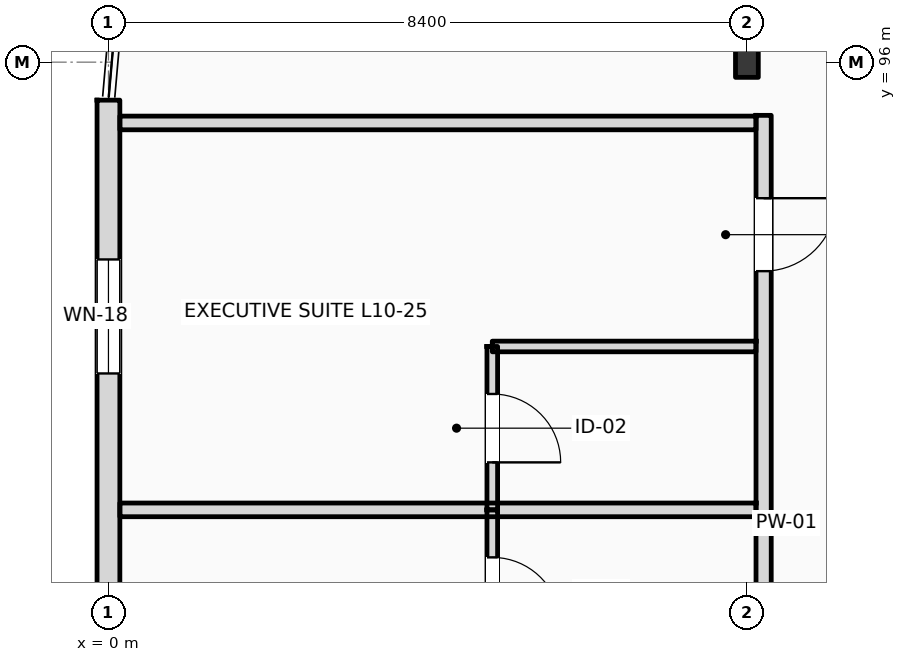
"""IFC4 building model, lengths in metres.
Left out: names, types, materials, properties, quantities, classifications, styles, units other than length and angle.
Written with IfcOpenShell. Run it as: python <this file> out.ifc"""

import sys

from ifc_helpers import new_model, si_unit, direction, frame, frame_2d, origin, origin_2d, place, context, subcontext, project, spatial, rectangle, i_section, extrude, element, fill, save


model = new_model("IFC4")
c1 = context("Model", 3, precision=1e-05, world=origin(), true_north=direction((0.0, 1.0)))
c2 = subcontext(c1, "Body", "Model", "MODEL_VIEW")
j1 = project(units=[si_unit("LENGTHUNIT", "METRE"), si_unit("PLANEANGLEUNIT", "RADIAN")], contexts=[c1])
p1 = place(None, origin())
s1 = spatial("IfcSite", under=j1, at=p1, CompositionType="ELEMENT")
p2 = place(p1, origin())
s2 = spatial("IfcBuilding", under=s1, at=p2, CompositionType="ELEMENT")
p3 = place(p2, frame((0.0, 0.0, 42.6)))
s3 = spatial("IfcBuildingStorey", under=s2, at=p3, CompositionType="ELEMENT", Elevation=42.6)
p4 = place(p3, frame((8.4, 96.0, 0.0), z_axis=(0.0, 0.0, 1.0), x_axis=(1.0, 0.0, 0.0)))
e1 = element("IfcColumn", 1, at=p4, inside=s3, PredefinedType="COLUMN", context=c2, shape_type="SweptSolid", body=[
    extrude(i_section(OverallWidth=0.3, OverallDepth=0.4, WebThickness=0.013, FlangeThickness=0.024, FilletRadius=0.027, at=origin_2d()), origin(), (0.0, 0.0, 1.0), 4.2),
])
p5 = place(p3, frame((0.0, 88.0, 0.0), z_axis=(0.0, 0.0, 1.0), x_axis=(0.0, 1.0, 0.0)))
e2 = element("IfcWall", 2, at=p5, inside=s3, PredefinedType="STANDARD", context=c2, shape_type="SweptSolid", body=[
    extrude(rectangle(XDim=7.5, YDim=0.3, at=frame_2d((3.75, 0.0))), origin(), (0.0, 0.0, 1.0), 3.94),
])
p6 = place(p5, frame((3.904, 0.0, 0.9)))
e3 = element("IfcOpeningElement", 3, at=p6, cuts=e2, PredefinedType="OPENING", context=c2, shape_type="SweptSolid", body=[
    extrude(rectangle(XDim=1.5, YDim=2.86, at=frame_2d((0.75, 1.43))), frame((0.0, 0.16, 0.0), z_axis=(0.0, -1.0, 0.0), x_axis=(1.0, 0.0, 0.0)), (0.0, 0.0, 1.0), 0.32),
])
p7 = place(p3, frame((8.62, 79.64, 0.0), z_axis=(0.0, 0.0, 1.0), x_axis=(0.0, 1.0, 0.0)))
e4 = element("IfcWall", 4, at=p7, inside=s3, PredefinedType="PARTITIONING", context=c2, shape_type="SweptSolid", body=[
    extrude(rectangle(XDim=15.66, YDim=0.2, at=frame_2d((7.83, 0.0))), origin(), (0.0, 0.0, 1.0), 3.57),
])
p8 = place(p7, frame((3.28, 0.0, 0.0)))
e5 = element("IfcOpeningElement", 5, at=p8, cuts=e4, PredefinedType="OPENING", context=c2, shape_type="SweptSolid", body=[
    extrude(rectangle(XDim=0.96, YDim=2.2, at=frame_2d((0.48, 1.1))), frame((0.0, 0.11, 0.0), z_axis=(0.0, -1.0, 0.0), x_axis=(1.0, 0.0, 0.0)), (0.0, 0.0, 1.0), 0.22),
])
p9 = place(p7, frame((6.034, 0.0, 0.0)))
e6 = element("IfcOpeningElement", 6, at=p9, cuts=e4, PredefinedType="OPENING", context=c2, shape_type="SweptSolid", body=[
    extrude(rectangle(XDim=0.96, YDim=2.2, at=frame_2d((0.48, 1.1))), frame((0.0, 0.11, 0.0), z_axis=(0.0, -1.0, 0.0), x_axis=(1.0, 0.0, 0.0)), (0.0, 0.0, 1.0), 0.22),
])
p10 = place(p7, frame((13.61, 0.0, 0.0)))
e7 = element("IfcOpeningElement", 7, at=p10, cuts=e4, PredefinedType="OPENING", context=c2, shape_type="SweptSolid", body=[
    extrude(rectangle(XDim=0.96, YDim=2.2, at=frame_2d((0.48, 1.1))), frame((0.0, 0.11, 0.0), z_axis=(0.0, -1.0, 0.0), x_axis=(1.0, 0.0, 0.0)), (0.0, 0.0, 1.0), 0.22),
])
p11 = place(p3, frame((0.15, 90.109, 0.0), z_axis=(0.0, 0.0, 1.0), x_axis=(1.0, 0.0, 0.0)))
e8 = element("IfcWall", 8, at=p11, inside=s3, PredefinedType="PARTITIONING", context=c2, shape_type="SweptSolid", body=[
    extrude(rectangle(XDim=8.37, YDim=0.18, at=frame_2d((4.185, 0.0))), origin(), (0.0, 0.0, 1.0), 3.94),
])
p12 = place(p3, frame((5.05, 87.959, 0.0), z_axis=(0.0, 0.0, 1.0), x_axis=(0.0, 1.0, 0.0)))
e9 = element("IfcWall", 9, at=p12, inside=s3, PredefinedType="PARTITIONING", context=c2, shape_type="SweptSolid", body=[
    extrude(rectangle(XDim=2.15, YDim=0.14, at=frame_2d((1.075, 0.0))), origin(), (0.0, 0.0, 1.0), 3.94),
])
p13 = place(p12, frame((0.625, 0.0, 0.0)))
e10 = element("IfcOpeningElement", 10, at=p13, cuts=e9, PredefinedType="OPENING", context=c2, shape_type="SweptSolid", body=[
    extrude(rectangle(XDim=0.9, YDim=2.1, at=frame_2d((0.45, 1.05))), frame((0.0, 0.08, 0.0), z_axis=(0.0, -1.0, 0.0), x_axis=(1.0, 0.0, 0.0)), (0.0, 0.0, 1.0), 0.16),
])
p14 = place(p3, frame((0.15, 95.2, 0.0), z_axis=(0.0, 0.0, 1.0), x_axis=(1.0, 0.0, 0.0)))
e11 = element("IfcWall", 11, at=p14, inside=s3, PredefinedType="PARTITIONING", context=c2, shape_type="SweptSolid", body=[
    extrude(rectangle(XDim=8.37, YDim=0.18, at=frame_2d((4.185, 0.0))), origin(), (0.0, 0.0, 1.0), 3.94),
])
p15 = place(p3, frame((5.05, 92.259, 0.0), z_axis=(0.0, 0.0, 1.0), x_axis=(1.0, 0.0, 0.0)))
e12 = element("IfcWall", 12, at=p15, inside=s3, PredefinedType="PARTITIONING", context=c2, shape_type="SweptSolid", body=[
    extrude(rectangle(XDim=3.47, YDim=0.14, at=frame_2d((1.735, 0.0))), origin(), (0.0, 0.0, 1.0), 3.94),
])
p16 = place(p3, frame((5.05, 90.109, 0.0), z_axis=(0.0, 0.0, 1.0), x_axis=(0.0, 1.0, 0.0)))
e13 = element("IfcWall", 13, at=p16, inside=s3, PredefinedType="PARTITIONING", context=c2, shape_type="SweptSolid", body=[
    extrude(rectangle(XDim=2.15, YDim=0.14, at=frame_2d((1.075, 0.0))), origin(), (0.0, 0.0, 1.0), 3.94),
])
p17 = place(p16, frame((0.625, 0.0, 0.0)))
e14 = element("IfcOpeningElement", 14, at=p17, cuts=e13, PredefinedType="OPENING", context=c2, shape_type="SweptSolid", body=[
    extrude(rectangle(XDim=0.9, YDim=2.1, at=frame_2d((0.45, 1.05))), frame((0.0, 0.08, 0.0), z_axis=(0.0, -1.0, 0.0), x_axis=(1.0, 0.0, 0.0)), (0.0, 0.0, 1.0), 0.16),
])
p18 = place(p6, origin())
e15 = element("IfcWindow", 15, at=p18, inside=s3, PartitioningType="DOUBLE_PANEL_VERTICAL", PredefinedType="WINDOW", context=c2, shape_type="SweptSolid", body=[
    extrude(rectangle(XDim=1.5, YDim=2.86, at=frame_2d((0.75, 1.43))), frame((0.0, 0.03, 0.0), z_axis=(0.0, -1.0, 0.0), x_axis=(1.0, 0.0, 0.0)), (0.0, 0.0, 1.0), 0.06),
])
fill(e3, e15)
p19 = place(p13, frame((0.9, 0.0, 0.0), z_axis=(0.0, 0.0, 1.0), x_axis=(-1.0, 0.0, 0.0)))
e16 = element("IfcDoor", 16, at=p19, inside=s3, OperationType="SINGLE_SWING_LEFT", PredefinedType="DOOR", context=c2, shape_type="SweptSolid", body=[
    extrude(rectangle(XDim=0.9, YDim=2.1, at=frame_2d((0.45, 1.05))), frame((0.0, 0.025, 0.0), z_axis=(0.0, -1.0, 0.0), x_axis=(1.0, 0.0, 0.0)), (0.0, 0.0, 1.0), 0.05),
])
fill(e10, e16)
p20 = place(p10, frame((0.96, 0.0, 0.0), z_axis=(0.0, 0.0, 1.0), x_axis=(-1.0, 0.0, 0.0)))
e17 = element("IfcDoor", 17, at=p20, inside=s3, OperationType="SINGLE_SWING_RIGHT", PredefinedType="DOOR", context=c2, shape_type="SweptSolid", body=[
    extrude(rectangle(XDim=0.96, YDim=2.2, at=frame_2d((0.48, 1.1))), frame((0.0, 0.025, 0.0), z_axis=(0.0, -1.0, 0.0), x_axis=(1.0, 0.0, 0.0)), (0.0, 0.0, 1.0), 0.05),
])
fill(e7, e17)
p21 = place(p17, frame((0.9, 0.0, 0.0), z_axis=(0.0, 0.0, 1.0), x_axis=(-1.0, 0.0, 0.0)))
e18 = element("IfcDoor", 18, at=p21, inside=s3, OperationType="SINGLE_SWING_LEFT", PredefinedType="DOOR", context=c2, shape_type="SweptSolid", body=[
    extrude(rectangle(XDim=0.9, YDim=2.1, at=frame_2d((0.45, 1.05))), frame((0.0, 0.025, 0.0), z_axis=(0.0, -1.0, 0.0), x_axis=(1.0, 0.0, 0.0)), (0.0, 0.0, 1.0), 0.05),
])
fill(e14, e18)
save(model, sys.argv[1])
